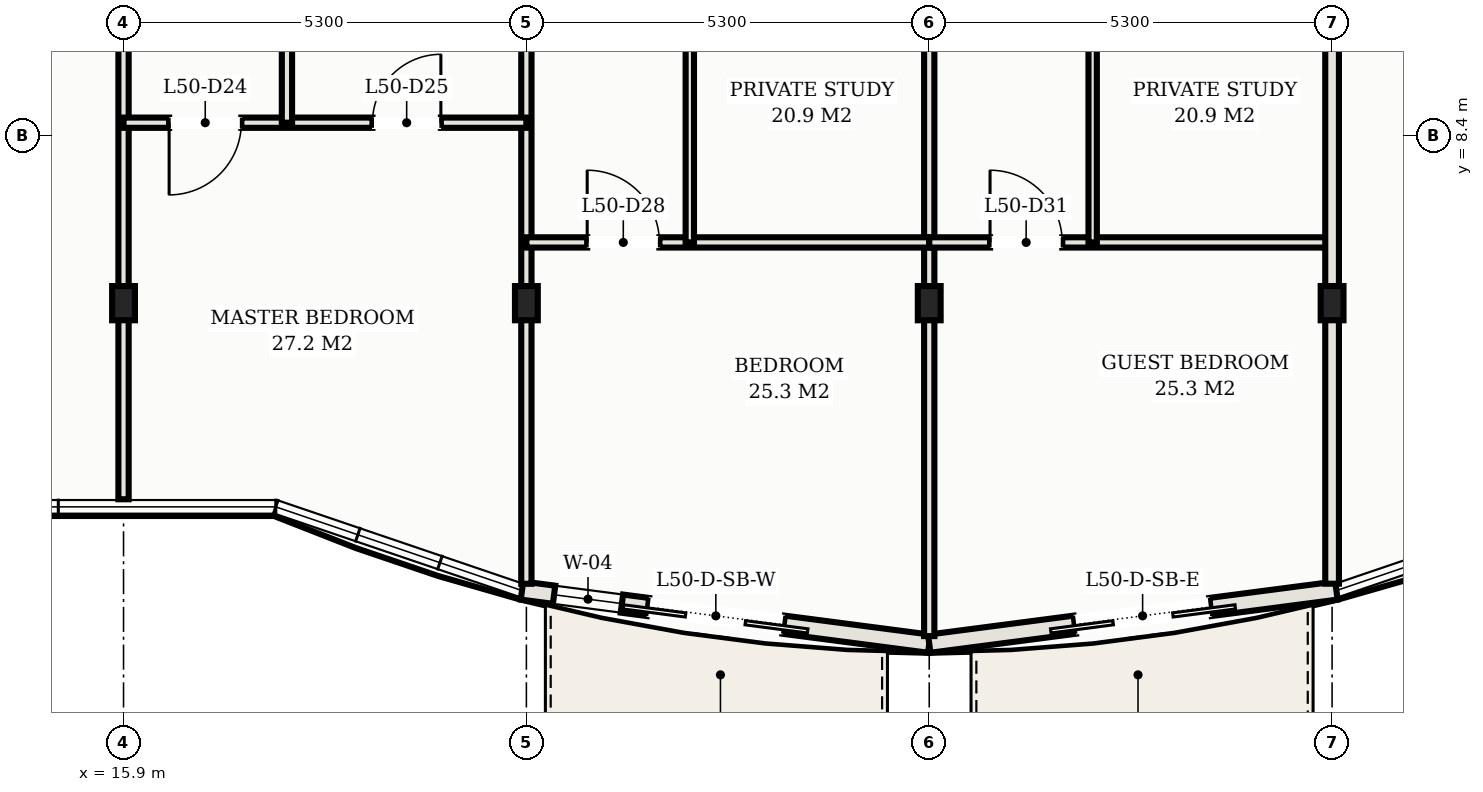
"""IFC4 building model, lengths in metres.
Left out: names, types, materials, properties, quantities, classifications, styles, units other than length and angle.
Written with IfcOpenShell. Run it as: python <this file> out.ifc"""

import sys

from ifc_helpers import new_model, si_unit, direction, frame, frame_2d, origin, origin_2d, place, context, subcontext, project, spatial, rectangle, hollow_rectangle, extrude, element, fill, save


model = new_model("IFC4")
c1 = context("Model", 3, precision=1e-05, world=origin(), true_north=direction((0.0, 1.0)))
c2 = subcontext(c1, "Body", "Model", "MODEL_VIEW")
j1 = project(units=[si_unit("LENGTHUNIT", "METRE"), si_unit("PLANEANGLEUNIT", "RADIAN")], contexts=[c1])
p1 = place(None, origin())
s1 = spatial("IfcSite", under=j1, at=p1, CompositionType="ELEMENT")
p2 = place(p1, origin())
s2 = spatial("IfcBuilding", under=s1, at=p2, CompositionType="ELEMENT")
p3 = place(p2, frame((0.0, 0.0, 182.1)))
s3 = spatial("IfcBuildingStorey", under=s2, at=p3, CompositionType="ELEMENT", Elevation=182.1)
for number, where, z_axis, x_axis in (
    (1, (15.9, 6.2, 0.0), (0.0, 0.0, 1.0), (1.0, 0.0, 0.0)),
    (2, (21.2, 6.2, 0.0), (0.0, 0.0, 1.0), (1.0, 0.0, 0.0)),
    (3, (26.5, 6.2, 0.0), (0.0, 0.0, 1.0), (1.0, 0.0, 0.0)),
    (4, (31.8, 6.2, 0.0), (0.0, 0.0, 1.0), (1.0, 0.0, 0.0)),
):
    element("IfcColumn", number, at=place(p3, frame(where, z_axis=z_axis, x_axis=x_axis)), inside=s3, PredefinedType="COLUMN", context=c2, shape_type="SweptSolid", body=[
        extrude(hollow_rectangle(XDim=0.3, YDim=0.45, WallThickness=0.016, at=origin_2d()), origin(), (0.0, 0.0, 1.0), 3.3),
    ])
p4 = place(p3, frame((21.142, 2.419, 0.0), z_axis=(0.0, 0.0, 1.0), x_axis=(0.991597639478, -0.129360432053, 0.0)))
e5 = element("IfcWall", 5, at=p4, inside=s3, PredefinedType="SOLIDWALL", context=c2, shape_type="SweptSolid", body=[
    extrude(rectangle(XDim=5.403, YDim=0.24, at=frame_2d((2.702, 0.0))), origin(), (0.0, 0.0, 1.0), 3.03),
])
p5 = place(p4, frame((1.672, 0.0, 0.0)))
e6 = element("IfcOpeningElement", 6, at=p5, cuts=e5, PredefinedType="OPENING", context=c2, shape_type="SweptSolid", body=[
    extrude(rectangle(XDim=1.8, YDim=2.2, at=frame_2d((0.9, 1.1))), frame((0.0, 0.13, 0.0), z_axis=(0.0, -1.0, 0.0), x_axis=(1.0, 0.0, 0.0)), (0.0, 0.0, 1.0), 0.26),
])
p6 = place(p4, frame((0.426, 0.0, 0.75)))
e7 = element("IfcOpeningElement", 7, at=p6, cuts=e5, PredefinedType="OPENING", context=c2, shape_type="SweptSolid", body=[
    extrude(rectangle(XDim=0.9, YDim=1.2, at=frame_2d((0.45, 0.6))), frame((0.0, 0.13, 0.0), z_axis=(0.0, -1.0, 0.0), x_axis=(1.0, 0.0, 0.0)), (0.0, 0.0, 1.0), 0.26),
])
p7 = place(p3, frame((26.5, 1.72, 0.0), z_axis=(0.0, 0.0, 1.0), x_axis=(0.991594614239, 0.129383619568, 0.0)))
e8 = element("IfcWall", 8, at=p7, inside=s3, PredefinedType="SOLIDWALL", context=c2, shape_type="SweptSolid", body=[
    extrude(rectangle(XDim=5.402, YDim=0.24, at=frame_2d((2.701, 0.0))), origin(), (0.0, 0.0, 1.0), 3.03),
])
p8 = place(p7, frame((1.931, 0.0, 0.0)))
e9 = element("IfcOpeningElement", 9, at=p8, cuts=e8, PredefinedType="OPENING", context=c2, shape_type="SweptSolid", body=[
    extrude(rectangle(XDim=1.8, YDim=2.2, at=frame_2d((0.9, 1.1))), frame((0.0, 0.13, 0.0), z_axis=(0.0, -1.0, 0.0), x_axis=(1.0, 0.0, 0.0)), (0.0, 0.0, 1.0), 0.26),
])
p9 = place(p3, frame((15.9, 3.62, 0.0), z_axis=(0.0, 0.0, 1.0), x_axis=(0.0, 1.0, 0.0)))
e10 = element("IfcWall", 10, at=p9, inside=s3, PredefinedType="PARTITIONING", context=c2, shape_type="SweptSolid", body=[
    extrude(rectangle(XDim=17.48, YDim=0.135, at=frame_2d((8.74, 0.0))), origin(), (0.0, 0.0, 1.0), 2.325),
])
p10 = place(p9, frame((15.695, 0.0, 0.0)))
e11 = element("IfcOpeningElement", 11, at=p10, cuts=e10, PredefinedType="OPENING", context=c2, shape_type="SweptSolid", body=[
    extrude(rectangle(XDim=0.92, YDim=2.15, at=frame_2d((0.46, 1.075))), frame((0.0, 0.078, 0.0), z_axis=(0.0, -1.0, 0.0), x_axis=(1.0, 0.0, 0.0)), (0.0, 0.0, 1.0), 0.155),
])
p11 = place(p3, frame((21.2, 2.508, 0.0), z_axis=(0.0, 0.0, 1.0), x_axis=(0.0, 1.0, 0.0)))
e12 = element("IfcWall", 12, at=p11, inside=s3, PredefinedType="PARTITIONING", context=c2, shape_type="SweptSolid", body=[
    extrude(rectangle(XDim=18.592, YDim=0.135, at=frame_2d((9.296, 0.0))), origin(), (0.0, 0.0, 1.0), 2.325),
])
p12 = place(p11, frame((16.807, 0.0, 0.0)))
e13 = element("IfcOpeningElement", 13, at=p12, cuts=e12, PredefinedType="OPENING", context=c2, shape_type="SweptSolid", body=[
    extrude(rectangle(XDim=0.92, YDim=2.15, at=frame_2d((0.46, 1.075))), frame((0.0, 0.078, 0.0), z_axis=(0.0, -1.0, 0.0), x_axis=(1.0, 0.0, 0.0)), (0.0, 0.0, 1.0), 0.155),
])
p13 = place(p3, frame((26.5, 1.82, 0.0), z_axis=(0.0, 0.0, 1.0), x_axis=(0.0, 1.0, 0.0)))
e14 = element("IfcWall", 14, at=p13, inside=s3, PredefinedType="PARTITIONING", context=c2, shape_type="SweptSolid", body=[
    extrude(rectangle(XDim=19.28, YDim=0.135, at=frame_2d((9.64, 0.0))), origin(), (0.0, 0.0, 1.0), 2.325),
])
p14 = place(p13, frame((17.495, 0.0, 0.0)))
e15 = element("IfcOpeningElement", 15, at=p14, cuts=e14, PredefinedType="OPENING", context=c2, shape_type="SweptSolid", body=[
    extrude(rectangle(XDim=0.92, YDim=2.15, at=frame_2d((0.46, 1.075))), frame((0.0, 0.078, 0.0), z_axis=(0.0, -1.0, 0.0), x_axis=(1.0, 0.0, 0.0)), (0.0, 0.0, 1.0), 0.155),
])
p15 = place(p3, frame((15.9, 8.574, 0.0), z_axis=(0.0, 0.0, 1.0), x_axis=(1.0, 0.0, 0.0)))
e16 = element("IfcWall", 16, at=p15, inside=s3, PredefinedType="PARTITIONING", context=c2, shape_type="SweptSolid", body=[
    extrude(rectangle(XDim=5.3, YDim=0.135, at=frame_2d((2.65, 0.0))), origin(), (0.0, 0.0, 1.0), 2.57),
])
p16 = place(p15, frame((0.6, 0.0, 0.0)))
e17 = element("IfcOpeningElement", 17, at=p16, cuts=e16, PredefinedType="OPENING", context=c2, shape_type="SweptSolid", body=[
    extrude(rectangle(XDim=0.95, YDim=2.15, at=frame_2d((0.475, 1.075))), frame((0.0, 0.078, 0.0), z_axis=(0.0, -1.0, 0.0), x_axis=(1.0, 0.0, 0.0)), (0.0, 0.0, 1.0), 0.155),
])
p17 = place(p15, frame((3.275, 0.0, 0.0)))
e18 = element("IfcOpeningElement", 18, at=p17, cuts=e16, PredefinedType="OPENING", context=c2, shape_type="SweptSolid", body=[
    extrude(rectangle(XDim=0.9, YDim=2.15, at=frame_2d((0.45, 1.075))), frame((0.0, 0.078, 0.0), z_axis=(0.0, -1.0, 0.0), x_axis=(1.0, 0.0, 0.0)), (0.0, 0.0, 1.0), 0.155),
])
p18 = place(p3, frame((18.05, 8.574, 0.0), z_axis=(0.0, 0.0, 1.0), x_axis=(0.0, 1.0, 0.0)))
e19 = element("IfcWall", 19, at=p18, inside=s3, PredefinedType="PARTITIONING", context=c2, shape_type="SweptSolid", body=[
    extrude(rectangle(XDim=12.526, YDim=0.135, at=frame_2d((6.263, 0.0))), origin(), (0.0, 0.0, 1.0), 2.57),
])
p19 = place(p18, frame((5.072, 0.0, 0.0)))
e20 = element("IfcOpeningElement", 20, at=p19, cuts=e19, PredefinedType="OPENING", context=c2, shape_type="SweptSolid", body=[
    extrude(rectangle(XDim=0.92, YDim=2.15, at=frame_2d((0.46, 1.075))), frame((0.0, 0.078, 0.0), z_axis=(0.0, -1.0, 0.0), x_axis=(1.0, 0.0, 0.0)), (0.0, 0.0, 1.0), 0.155),
])
p20 = place(p3, frame((21.2, 6.999, 0.0), z_axis=(0.0, 0.0, 1.0), x_axis=(1.0, 0.0, 0.0)))
e21 = element("IfcWall", 21, at=p20, inside=s3, PredefinedType="PARTITIONING", context=c2, shape_type="SweptSolid", body=[
    extrude(rectangle(XDim=5.3, YDim=0.135, at=frame_2d((2.65, 0.0))), origin(), (0.0, 0.0, 1.0), 2.57),
])
p21 = place(p20, frame((0.8, 0.0, 0.0)))
e22 = element("IfcOpeningElement", 22, at=p21, cuts=e21, PredefinedType="OPENING", context=c2, shape_type="SweptSolid", body=[
    extrude(rectangle(XDim=0.95, YDim=2.15, at=frame_2d((0.475, 1.075))), frame((0.0, 0.078, 0.0), z_axis=(0.0, -1.0, 0.0), x_axis=(1.0, 0.0, 0.0)), (0.0, 0.0, 1.0), 0.155),
])
p22 = place(p3, frame((23.35, 6.999, 0.0), z_axis=(0.0, 0.0, 1.0), x_axis=(0.0, 1.0, 0.0)))
e23 = element("IfcWall", 23, at=p22, inside=s3, PredefinedType="MOVABLE", context=c2, shape_type="SweptSolid", body=[
    extrude(rectangle(XDim=14.101, YDim=0.11, at=frame_2d((7.051, 0.0))), origin(), (0.0, 0.0, 1.0), 2.57),
])
p23 = place(p22, frame((3.066, 0.0, 0.0)))
e24 = element("IfcOpeningElement", 24, at=p23, cuts=e23, PredefinedType="OPENING", context=c2, shape_type="SweptSolid", body=[
    extrude(rectangle(XDim=0.92, YDim=2.15, at=frame_2d((0.46, 1.075))), frame((0.0, 0.065, 0.0), z_axis=(0.0, -1.0, 0.0), x_axis=(1.0, 0.0, 0.0)), (0.0, 0.0, 1.0), 0.13),
])
p24 = place(p22, frame((10.116, 0.0, 0.0)))
e25 = element("IfcOpeningElement", 25, at=p24, cuts=e23, PredefinedType="OPENING", context=c2, shape_type="SweptSolid", body=[
    extrude(rectangle(XDim=0.92, YDim=2.15, at=frame_2d((0.46, 1.075))), frame((0.0, 0.065, 0.0), z_axis=(0.0, -1.0, 0.0), x_axis=(1.0, 0.0, 0.0)), (0.0, 0.0, 1.0), 0.13),
])
p25 = place(p3, frame((26.5, 6.999, 0.0), z_axis=(0.0, 0.0, 1.0), x_axis=(1.0, 0.0, 0.0)))
e26 = element("IfcWall", 26, at=p25, inside=s3, PredefinedType="PARTITIONING", context=c2, shape_type="SweptSolid", body=[
    extrude(rectangle(XDim=5.3, YDim=0.135, at=frame_2d((2.65, 0.0))), origin(), (0.0, 0.0, 1.0), 2.57),
])
p26 = place(p25, frame((0.8, 0.0, 0.0)))
e27 = element("IfcOpeningElement", 27, at=p26, cuts=e26, PredefinedType="OPENING", context=c2, shape_type="SweptSolid", body=[
    extrude(rectangle(XDim=0.95, YDim=2.15, at=frame_2d((0.475, 1.075))), frame((0.0, 0.078, 0.0), z_axis=(0.0, -1.0, 0.0), x_axis=(1.0, 0.0, 0.0)), (0.0, 0.0, 1.0), 0.155),
])
p27 = place(p3, frame((28.65, 6.999, 0.0), z_axis=(0.0, 0.0, 1.0), x_axis=(0.0, 1.0, 0.0)))
e28 = element("IfcWall", 28, at=p27, inside=s3, PredefinedType="MOVABLE", context=c2, shape_type="SweptSolid", body=[
    extrude(rectangle(XDim=14.101, YDim=0.11, at=frame_2d((7.051, 0.0))), origin(), (0.0, 0.0, 1.0), 2.57),
])
p28 = place(p27, frame((3.066, 0.0, 0.0)))
e29 = element("IfcOpeningElement", 29, at=p28, cuts=e28, PredefinedType="OPENING", context=c2, shape_type="SweptSolid", body=[
    extrude(rectangle(XDim=0.92, YDim=2.15, at=frame_2d((0.46, 1.075))), frame((0.0, 0.065, 0.0), z_axis=(0.0, -1.0, 0.0), x_axis=(1.0, 0.0, 0.0)), (0.0, 0.0, 1.0), 0.13),
])
p29 = place(p27, frame((10.116, 0.0, 0.0)))
e30 = element("IfcOpeningElement", 30, at=p29, cuts=e28, PredefinedType="OPENING", context=c2, shape_type="SweptSolid", body=[
    extrude(rectangle(XDim=0.92, YDim=2.15, at=frame_2d((0.46, 1.075))), frame((0.0, 0.065, 0.0), z_axis=(0.0, -1.0, 0.0), x_axis=(1.0, 0.0, 0.0)), (0.0, 0.0, 1.0), 0.13),
])
p30 = place(p3, frame((31.8, 2.509, 0.0), z_axis=(0.0, 0.0, 1.0), x_axis=(0.0, 1.0, 0.0)))
e31 = element("IfcWall", 31, at=p30, inside=s3, PredefinedType="PARTITIONING", context=c2, shape_type="SweptSolid", body=[
    extrude(rectangle(XDim=18.591, YDim=0.18, at=frame_2d((9.295, 0.0))), origin(), (0.0, 0.0, 1.0), 2.325),
])
p31 = place(p5, frame((1.8, 0.0, 0.0), z_axis=(0.0, 0.0, 1.0), x_axis=(-1.0, 0.0, 0.0)))
e32 = element("IfcDoor", 32, at=p31, inside=s3, OperationType="DOUBLE_DOOR_SLIDING", PredefinedType="DOOR", context=c2, shape_type="SweptSolid", body=[
    extrude(rectangle(XDim=1.8, YDim=2.2, at=frame_2d((0.9, 1.1))), frame((0.0, 0.025, 0.0), z_axis=(0.0, -1.0, 0.0), x_axis=(1.0, 0.0, 0.0)), (0.0, 0.0, 1.0), 0.05),
])
fill(e6, e32)
p32 = place(p6, origin())
e33 = element("IfcWindow", 33, at=p32, inside=s3, PartitioningType="SINGLE_PANEL", PredefinedType="WINDOW", context=c2, shape_type="SweptSolid", body=[
    extrude(rectangle(XDim=0.9, YDim=1.2, at=frame_2d((0.45, 0.6))), frame((0.0, 0.03, 0.0), z_axis=(0.0, -1.0, 0.0), x_axis=(1.0, 0.0, 0.0)), (0.0, 0.0, 1.0), 0.06),
])
fill(e7, e33)
p33 = place(p8, frame((1.8, 0.0, 0.0), z_axis=(0.0, 0.0, 1.0), x_axis=(-1.0, 0.0, 0.0)))
e34 = element("IfcDoor", 34, at=p33, inside=s3, OperationType="DOUBLE_DOOR_SLIDING", PredefinedType="DOOR", context=c2, shape_type="SweptSolid", body=[
    extrude(rectangle(XDim=1.8, YDim=2.2, at=frame_2d((0.9, 1.1))), frame((0.0, 0.025, 0.0), z_axis=(0.0, -1.0, 0.0), x_axis=(1.0, 0.0, 0.0)), (0.0, 0.0, 1.0), 0.05),
])
fill(e9, e34)
p34 = place(p16, frame((0.95, 0.0, 0.0), z_axis=(0.0, 0.0, 1.0), x_axis=(-1.0, 0.0, 0.0)))
e35 = element("IfcDoor", 35, at=p34, inside=s3, OperationType="SINGLE_SWING_RIGHT", PredefinedType="DOOR", context=c2, shape_type="SweptSolid", body=[
    extrude(rectangle(XDim=0.95, YDim=2.15, at=frame_2d((0.475, 1.075))), frame((0.0, 0.025, 0.0), z_axis=(0.0, -1.0, 0.0), x_axis=(1.0, 0.0, 0.0)), (0.0, 0.0, 1.0), 0.05),
])
fill(e17, e35)
p35 = place(p17, origin())
e36 = element("IfcDoor", 36, at=p35, inside=s3, OperationType="SINGLE_SWING_RIGHT", PredefinedType="DOOR", context=c2, shape_type="SweptSolid", body=[
    extrude(rectangle(XDim=0.9, YDim=2.15, at=frame_2d((0.45, 1.075))), frame((0.0, 0.025, 0.0), z_axis=(0.0, -1.0, 0.0), x_axis=(1.0, 0.0, 0.0)), (0.0, 0.0, 1.0), 0.05),
])
fill(e18, e36)
p36 = place(p21, origin())
e37 = element("IfcDoor", 37, at=p36, inside=s3, OperationType="SINGLE_SWING_LEFT", PredefinedType="DOOR", context=c2, shape_type="SweptSolid", body=[
    extrude(rectangle(XDim=0.95, YDim=2.15, at=frame_2d((0.475, 1.075))), frame((0.0, 0.025, 0.0), z_axis=(0.0, -1.0, 0.0), x_axis=(1.0, 0.0, 0.0)), (0.0, 0.0, 1.0), 0.05),
])
fill(e22, e37)
p37 = place(p26, origin())
e38 = element("IfcDoor", 38, at=p37, inside=s3, OperationType="SINGLE_SWING_LEFT", PredefinedType="DOOR", context=c2, shape_type="SweptSolid", body=[
    extrude(rectangle(XDim=0.95, YDim=2.15, at=frame_2d((0.475, 1.075))), frame((0.0, 0.025, 0.0), z_axis=(0.0, -1.0, 0.0), x_axis=(1.0, 0.0, 0.0)), (0.0, 0.0, 1.0), 0.05),
])
fill(e27, e38)
save(model, sys.argv[1])
